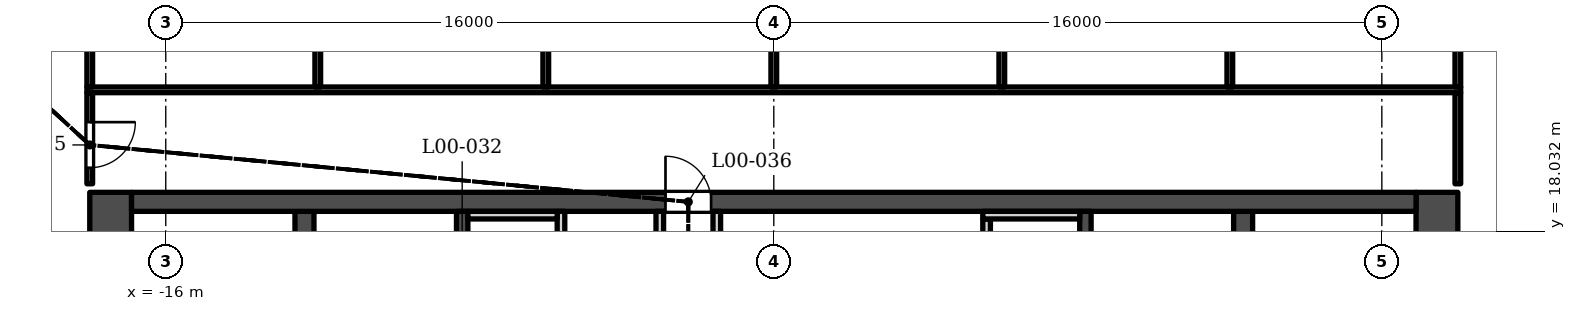
"""IFC4 building model, lengths in metres.
Left out: names, types, materials, properties, quantities, classifications, styles, units other than length and angle.
Written with IfcOpenShell. Run it as: python <this file> out.ifc"""

import sys

from ifc_helpers import new_model, si_unit, direction, frame, frame_2d, origin, place, context, subcontext, project, spatial, rectangle, extrude, element, fill, save


model = new_model("IFC4")
c1 = context("Model", 3, precision=1e-05, world=origin(), true_north=direction((0.0, 1.0)))
c2 = subcontext(c1, "Body", "Model", "MODEL_VIEW")
j1 = project(units=[si_unit("LENGTHUNIT", "METRE"), si_unit("PLANEANGLEUNIT", "RADIAN")], contexts=[c1])
p1 = place(None, origin())
s1 = spatial("IfcSite", under=j1, at=p1, CompositionType="ELEMENT")
p2 = place(p1, origin())
s2 = spatial("IfcBuilding", under=s1, at=p2, CompositionType="ELEMENT")
p3 = place(p2, origin())
s3 = spatial("IfcBuildingStorey", under=s2, at=p3, CompositionType="ELEMENT", Elevation=0.0)
p4 = place(p3, frame((-16.9, 18.802, 0.0), z_axis=(0.0, 0.0, 1.0), x_axis=(1.0, 0.0, 0.0)))
e1 = element("IfcWall", 1, at=p4, inside=s3, PredefinedType="SHEAR", context=c2, shape_type="SweptSolid", body=[
    extrude(rectangle(XDim=33.8, YDim=0.5, at=frame_2d((16.9, 0.0))), origin(), (0.0, 0.0, 1.0), 9.0),
])
p5 = place(p4, frame((14.05, 0.0, 0.0)))
e2 = element("IfcOpeningElement", 2, at=p5, cuts=e1, PredefinedType="OPENING", context=c2, shape_type="SweptSolid", body=[
    extrude(rectangle(XDim=1.2, YDim=2.1, at=frame_2d((0.6, 1.05))), frame((0.0, 0.26, 0.0), z_axis=(0.0, -1.0, 0.0), x_axis=(1.0, 0.0, 0.0)), (0.0, 0.0, 1.0), 0.52),
])
p6 = place(p3, frame((-12.35, 5.253, 0.0), z_axis=(0.0, 0.0, 1.0), x_axis=(0.0, 1.0, 0.0)))
e3 = element("IfcWall", 3, at=p6, inside=s3, PredefinedType="SHEAR", context=c2, shape_type="SweptSolid", body=[
    extrude(rectangle(XDim=13.3, YDim=0.5, at=frame_2d((6.65, 0.0))), origin(), (0.0, 0.0, 1.0), 9.0),
])
p7 = place(p3, frame((-8.2, 5.253, 0.0), z_axis=(0.0, 0.0, 1.0), x_axis=(0.0, 1.0, 0.0)))
e4 = element("IfcWall", 4, at=p7, inside=s3, PredefinedType="SHEAR", context=c2, shape_type="SweptSolid", body=[
    extrude(rectangle(XDim=13.3, YDim=0.3, at=frame_2d((6.65, 0.0))), origin(), (0.0, 0.0, 1.0), 9.0),
])
p8 = place(p7, frame((7.1, 0.0, 0.0)))
e5 = element("IfcOpeningElement", 5, at=p8, cuts=e4, PredefinedType="OPENING", context=c2, shape_type="SweptSolid", body=[
    extrude(rectangle(XDim=1.4, YDim=2.1, at=frame_2d((0.7, 1.05))), frame((0.0, 0.16, 0.0), z_axis=(0.0, -1.0, 0.0), x_axis=(1.0, 0.0, 0.0)), (0.0, 0.0, 1.0), 0.32),
])
p9 = place(p7, frame((5.05, 0.0, 0.0)))
e6 = element("IfcOpeningElement", 6, at=p9, cuts=e4, PredefinedType="OPENING", context=c2, shape_type="SweptSolid", body=[
    extrude(rectangle(XDim=1.4, YDim=2.1, at=frame_2d((0.7, 1.05))), frame((0.0, 0.16, 0.0), z_axis=(0.0, -1.0, 0.0), x_axis=(1.0, 0.0, 0.0)), (0.0, 0.0, 1.0), 0.32),
])
p10 = place(p3, frame((12.35, 5.253, 0.0), z_axis=(0.0, 0.0, 1.0), x_axis=(0.0, 1.0, 0.0)))
e7 = element("IfcWall", 7, at=p10, inside=s3, PredefinedType="SHEAR", context=c2, shape_type="SweptSolid", body=[
    extrude(rectangle(XDim=13.3, YDim=0.5, at=frame_2d((6.65, 0.0))), origin(), (0.0, 0.0, 1.0), 9.0),
])
p11 = place(p3, frame((8.2, 5.253, 0.0), z_axis=(0.0, 0.0, 1.0), x_axis=(0.0, 1.0, 0.0)))
e8 = element("IfcWall", 8, at=p11, inside=s3, PredefinedType="SHEAR", context=c2, shape_type="SweptSolid", body=[
    extrude(rectangle(XDim=13.3, YDim=0.3, at=frame_2d((6.65, 0.0))), origin(), (0.0, 0.0, 1.0), 9.0),
])
p12 = place(p11, frame((7.1, 0.0, 0.0)))
e9 = element("IfcOpeningElement", 9, at=p12, cuts=e8, PredefinedType="OPENING", context=c2, shape_type="SweptSolid", body=[
    extrude(rectangle(XDim=1.4, YDim=2.1, at=frame_2d((0.7, 1.05))), frame((0.0, 0.16, 0.0), z_axis=(0.0, -1.0, 0.0), x_axis=(1.0, 0.0, 0.0)), (0.0, 0.0, 1.0), 0.32),
])
p13 = place(p11, frame((5.05, 0.0, 0.0)))
e10 = element("IfcOpeningElement", 10, at=p13, cuts=e8, PredefinedType="OPENING", context=c2, shape_type="SweptSolid", body=[
    extrude(rectangle(XDim=1.4, YDim=2.1, at=frame_2d((0.7, 1.05))), frame((0.0, 0.16, 0.0), z_axis=(0.0, -1.0, 0.0), x_axis=(1.0, 0.0, 0.0)), (0.0, 0.0, 1.0), 0.32),
])
p14 = place(p3, frame((-17.45, 5.853, 0.0), z_axis=(0.0, 0.0, 1.0), x_axis=(0.0, 1.0, 0.0)))
e11 = element("IfcWall", 11, at=p14, inside=s3, PredefinedType="SHEAR", context=c2, shape_type="SweptSolid", body=[
    extrude(rectangle(XDim=13.2, YDim=1.1, at=frame_2d((6.6, 0.0))), origin(), (0.0, 0.0, 1.0), 9.0),
])
p15 = place(p14, frame((4.1, 0.0, 0.0)))
e12 = element("IfcOpeningElement", 12, at=p15, cuts=e11, PredefinedType="OPENING", context=c2, shape_type="SweptSolid", body=[
    extrude(rectangle(XDim=1.6, YDim=2.1, at=frame_2d((0.8, 1.05))), frame((0.0, 0.56, 0.0), z_axis=(0.0, -1.0, 0.0), x_axis=(1.0, 0.0, 0.0)), (0.0, 0.0, 1.0), 1.12),
])
p16 = place(p14, frame((9.75, 0.0, 0.0)))
e13 = element("IfcOpeningElement", 13, at=p16, cuts=e11, PredefinedType="OPENING", context=c2, shape_type="SweptSolid", body=[
    extrude(rectangle(XDim=0.9, YDim=2.1, at=frame_2d((0.45, 1.05))), frame((0.0, 0.56, 0.0), z_axis=(0.0, -1.0, 0.0), x_axis=(1.0, 0.0, 0.0)), (0.0, 0.0, 1.0), 1.12),
])
p17 = place(p3, frame((17.45, 5.853, 0.0), z_axis=(0.0, 0.0, 1.0), x_axis=(0.0, 1.0, 0.0)))
e14 = element("IfcWall", 14, at=p17, inside=s3, PredefinedType="SHEAR", context=c2, shape_type="SweptSolid", body=[
    extrude(rectangle(XDim=13.2, YDim=1.1, at=frame_2d((6.6, 0.0))), origin(), (0.0, 0.0, 1.0), 9.0),
])
p18 = place(p17, frame((4.1, 0.0, 0.0)))
e15 = element("IfcOpeningElement", 15, at=p18, cuts=e14, PredefinedType="OPENING", context=c2, shape_type="SweptSolid", body=[
    extrude(rectangle(XDim=1.6, YDim=2.1, at=frame_2d((0.8, 1.05))), frame((0.0, 0.56, 0.0), z_axis=(0.0, -1.0, 0.0), x_axis=(1.0, 0.0, 0.0)), (0.0, 0.0, 1.0), 1.12),
])
p19 = place(p17, frame((10.15, 0.0, 0.0)))
e16 = element("IfcOpeningElement", 16, at=p19, cuts=e14, PredefinedType="OPENING", context=c2, shape_type="SweptSolid", body=[
    extrude(rectangle(XDim=0.9, YDim=2.1, at=frame_2d((0.45, 1.05))), frame((0.0, 0.56, 0.0), z_axis=(0.0, -1.0, 0.0), x_axis=(1.0, 0.0, 0.0)), (0.0, 0.0, 1.0), 1.12),
])
p20 = place(p3, frame((-5.6, 14.253, 0.0), z_axis=(0.0, 0.0, 1.0), x_axis=(0.0, 1.0, 0.0)))
e17 = element("IfcWall", 17, at=p20, inside=s3, PredefinedType="SOLIDWALL", context=c2, shape_type="SweptSolid", body=[
    extrude(rectangle(XDim=4.3, YDim=0.2, at=frame_2d((2.15, 0.0))), origin(), (0.0, 0.0, 1.0), 8.5),
])
p21 = place(p3, frame((5.6, 15.453, 0.0), z_axis=(0.0, 0.0, 1.0), x_axis=(0.0, 1.0, 0.0)))
e18 = element("IfcWall", 18, at=p21, inside=s3, PredefinedType="SOLIDWALL", context=c2, shape_type="SweptSolid", body=[
    extrude(rectangle(XDim=2.9, YDim=0.2, at=frame_2d((1.45, 0.0))), origin(), (0.0, 0.0, 1.0), 8.5),
])
p22 = place(p3, frame((-3.0, 15.503, 0.0), z_axis=(0.0, 0.0, 1.0), x_axis=(0.0, 1.0, 0.0)))
e19 = element("IfcWall", 19, at=p22, inside=s3, PredefinedType="SOLIDWALL", context=c2, shape_type="SweptSolid", body=[
    extrude(rectangle(XDim=3.05, YDim=0.2, at=frame_2d((1.525, 0.0))), origin(), (0.0, 0.0, 1.0), 8.5),
])
p23 = place(p22, frame((0.12, 0.0, 0.0)))
e20 = element("IfcOpeningElement", 20, at=p23, cuts=e19, PredefinedType="OPENING", context=c2, shape_type="SweptSolid", body=[
    extrude(rectangle(XDim=0.9, YDim=2.1, at=frame_2d((0.45, 1.05))), frame((0.0, 0.11, 0.0), z_axis=(0.0, -1.0, 0.0), x_axis=(1.0, 0.0, 0.0)), (0.0, 0.0, 1.0), 0.22),
])
p24 = place(p22, frame((1.67, 0.0, 0.0)))
e21 = element("IfcOpeningElement", 21, at=p24, cuts=e19, PredefinedType="OPENING", context=c2, shape_type="SweptSolid", body=[
    extrude(rectangle(XDim=0.9, YDim=2.1, at=frame_2d((0.45, 1.05))), frame((0.0, 0.11, 0.0), z_axis=(0.0, -1.0, 0.0), x_axis=(1.0, 0.0, 0.0)), (0.0, 0.0, 1.0), 0.22),
])
p25 = place(p3, frame((-1.5, 15.503, 0.0), z_axis=(0.0, 0.0, 1.0), x_axis=(0.0, 1.0, 0.0)))
e22 = element("IfcWall", 22, at=p25, inside=s3, PredefinedType="SOLIDWALL", context=c2, shape_type="SweptSolid", body=[
    extrude(rectangle(XDim=3.05, YDim=0.2, at=frame_2d((1.525, 0.0))), origin(), (0.0, 0.0, 1.0), 8.5),
])
p26 = place(p25, frame((0.43, 0.0, 0.0)))
e23 = element("IfcOpeningElement", 23, at=p26, cuts=e22, PredefinedType="OPENING", context=c2, shape_type="SweptSolid", body=[
    extrude(rectangle(XDim=0.9, YDim=2.1, at=frame_2d((0.45, 1.05))), frame((0.0, 0.11, 0.0), z_axis=(0.0, -1.0, 0.0), x_axis=(1.0, 0.0, 0.0)), (0.0, 0.0, 1.0), 0.22),
])
p27 = place(p25, frame((1.98, 0.0, 0.0)))
e24 = element("IfcOpeningElement", 24, at=p27, cuts=e22, PredefinedType="OPENING", context=c2, shape_type="SweptSolid", body=[
    extrude(rectangle(XDim=0.9, YDim=2.1, at=frame_2d((0.45, 1.05))), frame((0.0, 0.11, 0.0), z_axis=(0.0, -1.0, 0.0), x_axis=(1.0, 0.0, 0.0)), (0.0, 0.0, 1.0), 0.22),
])
p28 = place(p3, frame((-8.05, 18.453, 0.0), z_axis=(0.0, 0.0, 1.0), x_axis=(1.0, 0.0, 0.0)))
e25 = element("IfcWall", 25, at=p28, inside=s3, PredefinedType="SOLIDWALL", context=c2, shape_type="SweptSolid", body=[
    extrude(rectangle(XDim=2.35, YDim=0.2, at=frame_2d((1.175, 0.0))), origin(), (0.0, 0.0, 1.0), 8.5),
])
p29 = place(p3, frame((5.5, 18.453, 0.0), z_axis=(0.0, 0.0, 1.0), x_axis=(1.0, 0.0, 0.0)))
e26 = element("IfcWall", 26, at=p29, inside=s3, PredefinedType="SOLIDWALL", context=c2, shape_type="SweptSolid", body=[
    extrude(rectangle(XDim=2.55, YDim=0.2, at=frame_2d((1.275, 0.0))), origin(), (0.0, 0.0, 1.0), 8.5),
])
p30 = place(p3, frame((-18.0, 19.278, 0.0), z_axis=(0.0, 0.0, 1.0), x_axis=(0.0, 1.0, 0.0)))
e27 = element("IfcWall", 27, at=p30, inside=s3, PredefinedType="PARTITIONING", context=c2, shape_type="SweptSolid", body=[
    extrude(rectangle(XDim=2.397, YDim=0.15, at=frame_2d((1.198, 0.0))), origin(), (0.0, 0.0, 1.0), 8.5),
])
p31 = place(p30, frame((0.422, 0.0, 0.0)))
e28 = element("IfcOpeningElement", 28, at=p31, cuts=e27, PredefinedType="OPENING", context=c2, shape_type="SweptSolid", body=[
    extrude(rectangle(XDim=1.2, YDim=2.1, at=frame_2d((0.6, 1.05))), frame((0.0, 0.085, 0.0), z_axis=(0.0, -1.0, 0.0), x_axis=(1.0, 0.0, 0.0)), (0.0, 0.0, 1.0), 0.17),
])
p32 = place(p3, frame((18.0, 19.278, 0.0), z_axis=(0.0, 0.0, 1.0), x_axis=(0.0, 1.0, 0.0)))
e29 = element("IfcWall", 29, at=p32, inside=s3, PredefinedType="PARTITIONING", context=c2, shape_type="SweptSolid", body=[
    extrude(rectangle(XDim=2.397, YDim=0.15, at=frame_2d((1.198, 0.0))), origin(), (0.0, 0.0, 1.0), 8.5),
])
p33 = place(p3, frame((-18.075, 21.75, 0.0), z_axis=(0.0, 0.0, 1.0), x_axis=(1.0, 0.0, 0.0)))
e30 = element("IfcWall", 30, at=p33, inside=s3, PredefinedType="PARTITIONING", context=c2, shape_type="SweptSolid", body=[
    extrude(rectangle(XDim=36.15, YDim=0.15, at=frame_2d((18.075, 0.0))), origin(), (0.0, 0.0, 1.0), 7.3),
])
p34 = place(p33, frame((2.675, 0.0, 0.0)))
e31 = element("IfcOpeningElement", 31, at=p34, cuts=e30, PredefinedType="OPENING", context=c2, shape_type="SweptSolid", body=[
    extrude(rectangle(XDim=0.9, YDim=2.1, at=frame_2d((0.45, 1.05))), frame((0.0, 0.085, 0.0), z_axis=(0.0, -1.0, 0.0), x_axis=(1.0, 0.0, 0.0)), (0.0, 0.0, 1.0), 0.17),
])
p35 = place(p33, frame((8.675, 0.0, 0.0)))
e32 = element("IfcOpeningElement", 32, at=p35, cuts=e30, PredefinedType="OPENING", context=c2, shape_type="SweptSolid", body=[
    extrude(rectangle(XDim=0.9, YDim=2.1, at=frame_2d((0.45, 1.05))), frame((0.0, 0.085, 0.0), z_axis=(0.0, -1.0, 0.0), x_axis=(1.0, 0.0, 0.0)), (0.0, 0.0, 1.0), 0.17),
])
p36 = place(p33, frame((14.675, 0.0, 0.0)))
e33 = element("IfcOpeningElement", 33, at=p36, cuts=e30, PredefinedType="OPENING", context=c2, shape_type="SweptSolid", body=[
    extrude(rectangle(XDim=0.9, YDim=2.1, at=frame_2d((0.45, 1.05))), frame((0.0, 0.085, 0.0), z_axis=(0.0, -1.0, 0.0), x_axis=(1.0, 0.0, 0.0)), (0.0, 0.0, 1.0), 0.17),
])
p37 = place(p33, frame((20.675, 0.0, 0.0)))
e34 = element("IfcOpeningElement", 34, at=p37, cuts=e30, PredefinedType="OPENING", context=c2, shape_type="SweptSolid", body=[
    extrude(rectangle(XDim=0.9, YDim=2.1, at=frame_2d((0.45, 1.05))), frame((0.0, 0.085, 0.0), z_axis=(0.0, -1.0, 0.0), x_axis=(1.0, 0.0, 0.0)), (0.0, 0.0, 1.0), 0.17),
])
p38 = place(p33, frame((26.675, 0.0, 0.0)))
e35 = element("IfcOpeningElement", 35, at=p38, cuts=e30, PredefinedType="OPENING", context=c2, shape_type="SweptSolid", body=[
    extrude(rectangle(XDim=0.9, YDim=2.1, at=frame_2d((0.45, 1.05))), frame((0.0, 0.085, 0.0), z_axis=(0.0, -1.0, 0.0), x_axis=(1.0, 0.0, 0.0)), (0.0, 0.0, 1.0), 0.17),
])
p39 = place(p33, frame((32.675, 0.0, 0.0)))
e36 = element("IfcOpeningElement", 36, at=p39, cuts=e30, PredefinedType="OPENING", context=c2, shape_type="SweptSolid", body=[
    extrude(rectangle(XDim=0.9, YDim=2.1, at=frame_2d((0.45, 1.05))), frame((0.0, 0.085, 0.0), z_axis=(0.0, -1.0, 0.0), x_axis=(1.0, 0.0, 0.0)), (0.0, 0.0, 1.0), 0.17),
])
p40 = place(p3, frame((-18.0, 21.825, 0.0), z_axis=(0.0, 0.0, 1.0), x_axis=(0.0, 1.0, 0.0)))
e37 = element("IfcWall", 37, at=p40, inside=s3, PredefinedType="PARTITIONING", context=c2, shape_type="SweptSolid", body=[
    extrude(rectangle(XDim=2.945, YDim=0.15, at=frame_2d((1.473, 0.0))), origin(), (0.0, 0.0, 1.0), 7.3),
])
p41 = place(p3, frame((-12.0, 21.825, 0.0), z_axis=(0.0, 0.0, 1.0), x_axis=(0.0, 1.0, 0.0)))
e38 = element("IfcWall", 38, at=p41, inside=s3, PredefinedType="PARTITIONING", context=c2, shape_type="SweptSolid", body=[
    extrude(rectangle(XDim=1.775, YDim=0.15, at=frame_2d((0.888, 0.0))), origin(), (0.0, 0.0, 1.0), 8.5),
])
p42 = place(p3, frame((-6.0, 21.825, 0.0), z_axis=(0.0, 0.0, 1.0), x_axis=(0.0, 1.0, 0.0)))
e39 = element("IfcWall", 39, at=p42, inside=s3, PredefinedType="PARTITIONING", context=c2, shape_type="SweptSolid", body=[
    extrude(rectangle(XDim=2.945, YDim=0.15, at=frame_2d((1.473, 0.0))), origin(), (0.0, 0.0, 1.0), 7.3),
])
p43 = place(p3, frame((0.0, 21.825, 0.0), z_axis=(0.0, 0.0, 1.0), x_axis=(0.0, 1.0, 0.0)))
e40 = element("IfcWall", 40, at=p43, inside=s3, PredefinedType="PARTITIONING", context=c2, shape_type="SweptSolid", body=[
    extrude(rectangle(XDim=1.325, YDim=0.15, at=frame_2d((0.663, 0.0))), origin(), (0.0, 0.0, 1.0), 7.3),
])
p44 = place(p3, frame((6.0, 21.825, 0.0), z_axis=(0.0, 0.0, 1.0), x_axis=(0.0, 1.0, 0.0)))
e41 = element("IfcWall", 41, at=p44, inside=s3, PredefinedType="PARTITIONING", context=c2, shape_type="SweptSolid", body=[
    extrude(rectangle(XDim=2.945, YDim=0.15, at=frame_2d((1.473, 0.0))), origin(), (0.0, 0.0, 1.0), 7.3),
])
p45 = place(p3, frame((12.0, 21.825, 0.0), z_axis=(0.0, 0.0, 1.0), x_axis=(0.0, 1.0, 0.0)))
e42 = element("IfcWall", 42, at=p45, inside=s3, PredefinedType="PARTITIONING", context=c2, shape_type="SweptSolid", body=[
    extrude(rectangle(XDim=1.775, YDim=0.15, at=frame_2d((0.888, 0.0))), origin(), (0.0, 0.0, 1.0), 8.5),
])
p46 = place(p3, frame((18.0, 21.825, 0.0), z_axis=(0.0, 0.0, 1.0), x_axis=(0.0, 1.0, 0.0)))
e43 = element("IfcWall", 43, at=p46, inside=s3, PredefinedType="PARTITIONING", context=c2, shape_type="SweptSolid", body=[
    extrude(rectangle(XDim=2.945, YDim=0.15, at=frame_2d((1.473, 0.0))), origin(), (0.0, 0.0, 1.0), 7.3),
])
p47 = place(p5, origin())
e44 = element("IfcDoor", 44, at=p47, inside=s3, OperationType="SINGLE_SWING_LEFT", PredefinedType="DOOR", context=c2, shape_type="SweptSolid", body=[
    extrude(rectangle(XDim=1.2, YDim=2.1, at=frame_2d((0.6, 1.05))), frame((0.0, 0.025, 0.0), z_axis=(0.0, -1.0, 0.0), x_axis=(1.0, 0.0, 0.0)), (0.0, 0.0, 1.0), 0.05),
])
fill(e2, e44)
p48 = place(p24, origin())
e45 = element("IfcDoor", 45, at=p48, inside=s3, OperationType="SINGLE_SWING_LEFT", PredefinedType="DOOR", context=c2, shape_type="SweptSolid", body=[
    extrude(rectangle(XDim=0.9, YDim=2.1, at=frame_2d((0.45, 1.05))), frame((0.0, 0.025, 0.0), z_axis=(0.0, -1.0, 0.0), x_axis=(1.0, 0.0, 0.0)), (0.0, 0.0, 1.0), 0.05),
])
fill(e21, e45)
p49 = place(p27, origin())
e46 = element("IfcDoor", 46, at=p49, inside=s3, OperationType="SINGLE_SWING_LEFT", PredefinedType="DOOR", context=c2, shape_type="SweptSolid", body=[
    extrude(rectangle(XDim=0.9, YDim=2.1, at=frame_2d((0.45, 1.05))), frame((0.0, 0.025, 0.0), z_axis=(0.0, -1.0, 0.0), x_axis=(1.0, 0.0, 0.0)), (0.0, 0.0, 1.0), 0.05),
])
fill(e24, e46)
p50 = place(p31, origin())
e47 = element("IfcDoor", 47, at=p50, inside=s3, OperationType="SINGLE_SWING_RIGHT", PredefinedType="DOOR", context=c2, shape_type="SweptSolid", body=[
    extrude(rectangle(XDim=1.2, YDim=2.1, at=frame_2d((0.6, 1.05))), frame((0.0, 0.025, 0.0), z_axis=(0.0, -1.0, 0.0), x_axis=(1.0, 0.0, 0.0)), (0.0, 0.0, 1.0), 0.05),
])
fill(e28, e47)
p51 = place(p34, origin())
e48 = element("IfcDoor", 48, at=p51, inside=s3, OperationType="SINGLE_SWING_LEFT", PredefinedType="DOOR", context=c2, shape_type="SweptSolid", body=[
    extrude(rectangle(XDim=0.9, YDim=2.1, at=frame_2d((0.45, 1.05))), frame((0.0, 0.025, 0.0), z_axis=(0.0, -1.0, 0.0), x_axis=(1.0, 0.0, 0.0)), (0.0, 0.0, 1.0), 0.05),
])
fill(e31, e48)
p52 = place(p35, origin())
e49 = element("IfcDoor", 49, at=p52, inside=s3, OperationType="SINGLE_SWING_RIGHT", PredefinedType="DOOR", context=c2, shape_type="SweptSolid", body=[
    extrude(rectangle(XDim=0.9, YDim=2.1, at=frame_2d((0.45, 1.05))), frame((0.0, 0.025, 0.0), z_axis=(0.0, -1.0, 0.0), x_axis=(1.0, 0.0, 0.0)), (0.0, 0.0, 1.0), 0.05),
])
fill(e32, e49)
p53 = place(p36, origin())
e50 = element("IfcDoor", 50, at=p53, inside=s3, OperationType="SINGLE_SWING_RIGHT", PredefinedType="DOOR", context=c2, shape_type="SweptSolid", body=[
    extrude(rectangle(XDim=0.9, YDim=2.1, at=frame_2d((0.45, 1.05))), frame((0.0, 0.025, 0.0), z_axis=(0.0, -1.0, 0.0), x_axis=(1.0, 0.0, 0.0)), (0.0, 0.0, 1.0), 0.05),
])
fill(e33, e50)
p54 = place(p37, origin())
e51 = element("IfcDoor", 51, at=p54, inside=s3, OperationType="SINGLE_SWING_RIGHT", PredefinedType="DOOR", context=c2, shape_type="SweptSolid", body=[
    extrude(rectangle(XDim=0.9, YDim=2.1, at=frame_2d((0.45, 1.05))), frame((0.0, 0.025, 0.0), z_axis=(0.0, -1.0, 0.0), x_axis=(1.0, 0.0, 0.0)), (0.0, 0.0, 1.0), 0.05),
])
fill(e34, e51)
p55 = place(p38, origin())
e52 = element("IfcDoor", 52, at=p55, inside=s3, OperationType="SINGLE_SWING_LEFT", PredefinedType="DOOR", context=c2, shape_type="SweptSolid", body=[
    extrude(rectangle(XDim=0.9, YDim=2.1, at=frame_2d((0.45, 1.05))), frame((0.0, 0.025, 0.0), z_axis=(0.0, -1.0, 0.0), x_axis=(1.0, 0.0, 0.0)), (0.0, 0.0, 1.0), 0.05),
])
fill(e35, e52)
p56 = place(p39, origin())
e53 = element("IfcDoor", 53, at=p56, inside=s3, OperationType="SINGLE_SWING_RIGHT", PredefinedType="DOOR", context=c2, shape_type="SweptSolid", body=[
    extrude(rectangle(XDim=0.9, YDim=2.1, at=frame_2d((0.45, 1.05))), frame((0.0, 0.025, 0.0), z_axis=(0.0, -1.0, 0.0), x_axis=(1.0, 0.0, 0.0)), (0.0, 0.0, 1.0), 0.05),
])
fill(e36, e53)
save(model, sys.argv[1])
